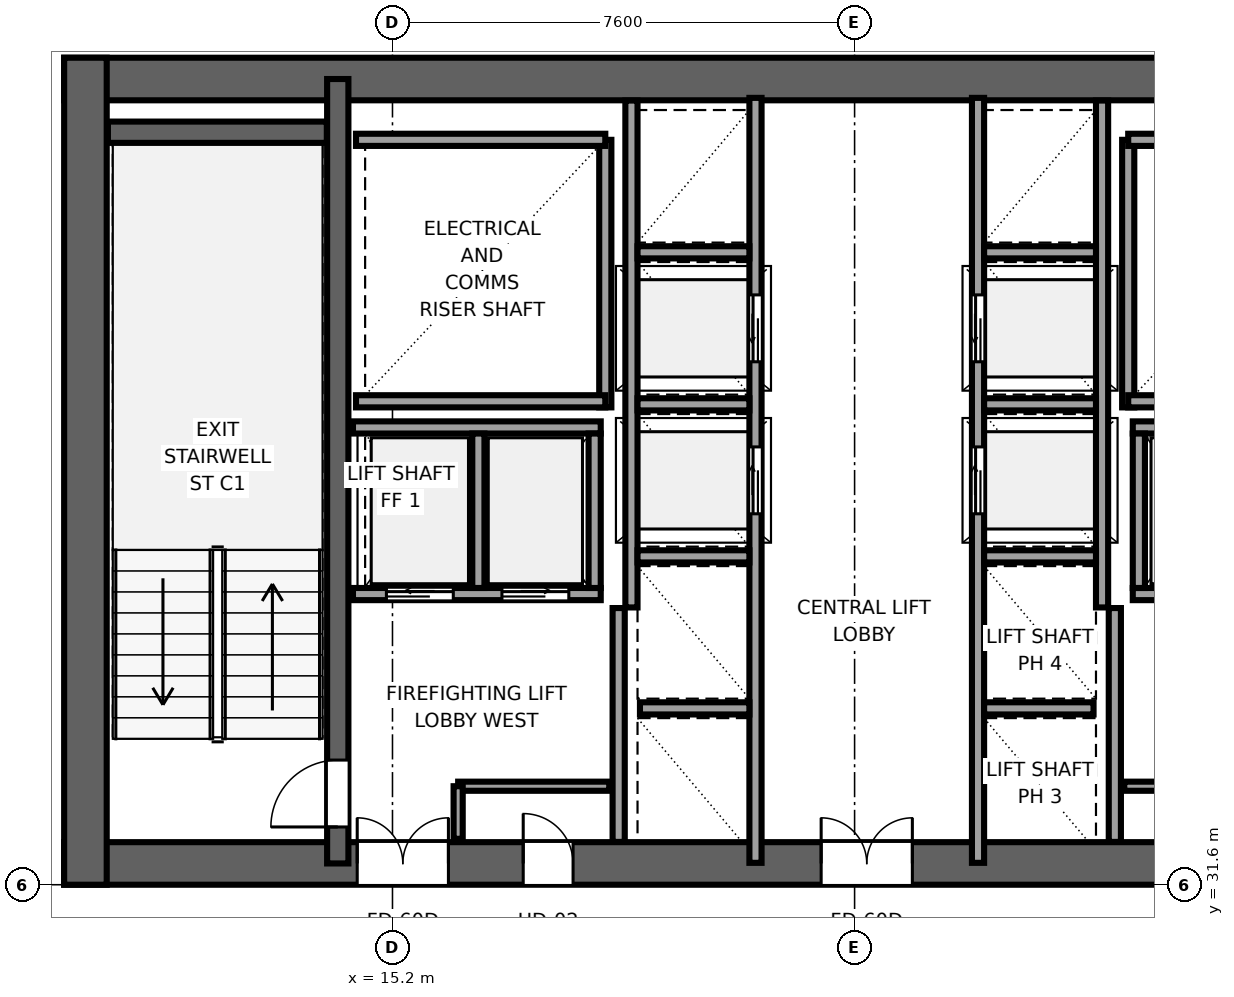
"""IFC4 building model, lengths in metres.
Left out: names, types, materials, properties, quantities, classifications, styles, units other than length and angle.
Written with IfcOpenShell. Run it as: python <this file> out.ifc"""

import sys

from ifc_helpers import new_model, si_unit, direction, frame, frame_2d, origin, place, context, subcontext, project, spatial, rectangle, extrude, source, transform, mapped, element, fill, save


model = new_model("IFC4")
c1 = context("Model", 3, precision=1e-05, world=origin(), true_north=direction((0.0, 1.0)))
c2 = subcontext(c1, "Body", "Model", "MODEL_VIEW")
j1 = project(units=[si_unit("LENGTHUNIT", "METRE"), si_unit("PLANEANGLEUNIT", "RADIAN")], contexts=[c1])
p1 = place(None, origin())
s1 = spatial("IfcSite", under=j1, at=p1, CompositionType="ELEMENT")
p2 = place(p1, origin())
s2 = spatial("IfcBuilding", under=s1, at=p2, CompositionType="ELEMENT")
p3 = place(p2, frame((0.0, 0.0, 115.1)))
s3 = spatial("IfcBuildingStorey", under=s2, at=p3, CompositionType="ELEMENT", Elevation=115.1)
p4 = place(p3, frame((9.8, 31.95, 0.0), z_axis=(0.0, 0.0, 1.0), x_axis=(1.0, 0.0, 0.0)))
e1 = element("IfcWall", 1, at=p4, inside=s3, PredefinedType="SHEAR", context=c2, shape_type="SweptSolid", body=[
    extrude(rectangle(XDim=26.4, YDim=0.7, at=frame_2d((13.2, 0.0))), origin(), (0.0, 0.0, 1.0), 3.55),
])
p5 = place(p4, frame((6.32, 0.0, 0.0), z_axis=(0.0, 0.0, 1.0), x_axis=(-1.0, 0.0, 0.0)))
e2 = element("IfcOpeningElement", 2, at=p5, cuts=e1, PredefinedType="OPENING", context=c2, shape_type="SweptSolid", body=[
    extrude(rectangle(XDim=1.5, YDim=2.04, at=frame_2d((0.75, 1.02))), frame((0.0, 0.36, 0.0), z_axis=(0.0, -1.0, 0.0), x_axis=(1.0, 0.0, 0.0)), (0.0, 0.0, 1.0), 0.72),
])
p6 = place(p4, frame((13.95, 0.0, 0.0), z_axis=(0.0, 0.0, 1.0), x_axis=(-1.0, 0.0, 0.0)))
e3 = element("IfcOpeningElement", 3, at=p6, cuts=e1, PredefinedType="OPENING", context=c2, shape_type="SweptSolid", body=[
    extrude(rectangle(XDim=1.5, YDim=2.04, at=frame_2d((0.75, 1.02))), frame((0.0, 0.36, 0.0), z_axis=(0.0, -1.0, 0.0), x_axis=(1.0, 0.0, 0.0)), (0.0, 0.0, 1.0), 0.72),
])
p7 = place(p4, frame((21.58, 0.0, 0.0), z_axis=(0.0, 0.0, 1.0), x_axis=(-1.0, 0.0, 0.0)))
e4 = element("IfcOpeningElement", 4, at=p7, cuts=e1, PredefinedType="OPENING", context=c2, shape_type="SweptSolid", body=[
    extrude(rectangle(XDim=1.5, YDim=2.04, at=frame_2d((0.75, 1.02))), frame((0.0, 0.36, 0.0), z_axis=(0.0, -1.0, 0.0), x_axis=(1.0, 0.0, 0.0)), (0.0, 0.0, 1.0), 0.72),
])
p8 = place(p4, frame((8.37, 0.0, 0.0), z_axis=(0.0, 0.0, 1.0), x_axis=(-1.0, 0.0, 0.0)))
e5 = element("IfcOpeningElement", 5, at=p8, cuts=e1, PredefinedType="OPENING", context=c2, shape_type="SweptSolid", body=[
    extrude(rectangle(XDim=0.82, YDim=2.01, at=frame_2d((0.41, 1.005))), frame((0.0, 0.36, 0.0), z_axis=(0.0, -1.0, 0.0), x_axis=(1.0, 0.0, 0.0)), (0.0, 0.0, 1.0), 0.72),
])
p9 = place(p4, frame((18.87, 0.0, 0.0), z_axis=(0.0, 0.0, 1.0), x_axis=(-1.0, 0.0, 0.0)))
e6 = element("IfcOpeningElement", 6, at=p9, cuts=e1, PredefinedType="OPENING", context=c2, shape_type="SweptSolid", body=[
    extrude(rectangle(XDim=0.82, YDim=2.01, at=frame_2d((0.41, 1.005))), frame((0.0, 0.36, 0.0), z_axis=(0.0, -1.0, 0.0), x_axis=(1.0, 0.0, 0.0)), (0.0, 0.0, 1.0), 0.72),
])
p10 = place(p3, frame((9.8, 44.85, 0.0), z_axis=(0.0, 0.0, 1.0), x_axis=(1.0, 0.0, 0.0)))
e7 = element("IfcWall", 7, at=p10, inside=s3, PredefinedType="SHEAR", context=c2, shape_type="SweptSolid", body=[
    extrude(rectangle(XDim=26.4, YDim=0.7, at=frame_2d((13.2, 0.0))), origin(), (0.0, 0.0, 1.0), 3.55),
])
p11 = place(p3, frame((10.15, 31.6, 0.0), z_axis=(0.0, 0.0, 1.0), x_axis=(0.0, 1.0, 0.0)))
e8 = element("IfcWall", 8, at=p11, inside=s3, PredefinedType="SHEAR", context=c2, shape_type="SweptSolid", body=[
    extrude(rectangle(XDim=13.6, YDim=0.7, at=frame_2d((6.8, 0.0))), origin(), (0.0, 0.0, 1.0), 3.55),
])
p12 = place(p3, frame((14.3, 31.95, 0.0), z_axis=(0.0, 0.0, 1.0), x_axis=(0.0, 1.0, 0.0)))
e9 = element("IfcWall", 9, at=p12, inside=s3, PredefinedType="SHEAR", context=c2, shape_type="SweptSolid", body=[
    extrude(rectangle(XDim=12.9, YDim=0.35, at=frame_2d((6.45, 0.0))), origin(), (0.0, 0.0, 1.0), 3.55),
])
p13 = place(p12, frame((0.6, 0.0, 0.0)))
e10 = element("IfcOpeningElement", 10, at=p13, cuts=e9, PredefinedType="OPENING", context=c2, shape_type="SweptSolid", body=[
    extrude(rectangle(XDim=1.1, YDim=2.12, at=frame_2d((0.55, 1.06))), frame((0.0, 0.185, 0.0), z_axis=(0.0, -1.0, 0.0), x_axis=(1.0, 0.0, 0.0)), (0.0, 0.0, 1.0), 0.37),
])
p14 = place(p3, frame((10.52, 43.975, 0.0), z_axis=(0.0, 0.0, 1.0), x_axis=(1.0, 0.0, 0.0)))
e11 = element("IfcWall", 11, at=p14, inside=s3, PredefinedType="SHEAR", context=c2, shape_type="SweptSolid", body=[
    extrude(rectangle(XDim=3.6, YDim=0.35, at=frame_2d((1.8, 0.0))), origin(), (0.0, 0.0, 1.0), 3.55),
])
p15 = place(p3, frame((18.7, 39.45, 0.0), z_axis=(0.0, 0.0, 1.0), x_axis=(0.0, 1.0, 0.0)))
e12 = element("IfcWall", 12, at=p15, inside=s3, PredefinedType="SOLIDWALL", context=c2, shape_type="SweptSolid", body=[
    extrude(rectangle(XDim=4.4, YDim=0.2, at=frame_2d((2.2, 0.0))), origin(), (0.0, 0.0, 1.0), 3.37),
])
for number, where, z_axis, x_axis in (
    (13, (14.6, 39.55, 0.0), (0.0, 0.0, 1.0), (1.0, 0.0, 0.0)),
    (14, (14.6, 43.85, 0.0), (0.0, 0.0, 1.0), (1.0, 0.0, 0.0)),
):
    element("IfcWall", number, at=place(p3, frame(where, z_axis=z_axis, x_axis=x_axis)), inside=s3, PredefinedType="SOLIDWALL", context=c2, shape_type="SweptSolid", body=[
        extrude(rectangle(XDim=4.1, YDim=0.2, at=frame_2d((2.05, 0.0))), origin(), (0.0, 0.0, 1.0), 3.37),
    ])
p16 = place(p3, frame((27.3, 39.45, 0.0), z_axis=(0.0, 0.0, 1.0), x_axis=(0.0, 1.0, 0.0)))
e15 = element("IfcWall", 15, at=p16, inside=s3, PredefinedType="SOLIDWALL", context=c2, shape_type="SweptSolid", body=[
    extrude(rectangle(XDim=4.4, YDim=0.2, at=frame_2d((2.2, 0.0))), origin(), (0.0, 0.0, 1.0), 3.37),
])
for number, where, z_axis, x_axis in (
    (16, (27.3, 39.55, 0.0), (0.0, 0.0, 1.0), (1.0, 0.0, 0.0)),
    (17, (27.3, 43.85, 0.0), (0.0, 0.0, 1.0), (1.0, 0.0, 0.0)),
):
    element("IfcWall", number, at=place(p3, frame(where, z_axis=z_axis, x_axis=x_axis)), inside=s3, PredefinedType="SOLIDWALL", context=c2, shape_type="SweptSolid", body=[
        extrude(rectangle(XDim=4.1, YDim=0.2, at=frame_2d((2.05, 0.0))), origin(), (0.0, 0.0, 1.0), 3.37),
    ])
for number, where, z_axis, x_axis in (
    (18, (18.92, 32.304, 0.0), (0.0, 0.0, 1.0), (0.0, 1.0, 0.0)),
    (19, (27.08, 32.304, 0.0), (0.0, 0.0, 1.0), (0.0, 1.0, 0.0)),
):
    element("IfcWall", number, at=place(p3, frame(where, z_axis=z_axis, x_axis=x_axis)), inside=s3, PredefinedType="SOLIDWALL", context=c2, shape_type="SweptSolid", body=[
        extrude(rectangle(XDim=3.846, YDim=0.2, at=frame_2d((1.923, 0.0))), origin(), (0.0, 0.0, 1.0), 3.37),
    ])
p17 = place(p3, frame((21.17, 31.96, 0.0), z_axis=(0.0, 0.0, 1.0), x_axis=(0.0, 1.0, 0.0)))
e20 = element("IfcWall", 20, at=p17, inside=s3, PredefinedType="SOLIDWALL", context=c2, shape_type="SweptSolid", body=[
    extrude(rectangle(XDim=12.58, YDim=0.2, at=frame_2d((6.29, 0.0))), origin(), (0.0, 0.0, 1.0), 3.37),
])
p18 = place(p17, frame((5.74, 0.0, 0.0)))
e21 = element("IfcOpeningElement", 21, at=p18, cuts=e20, PredefinedType="OPENING", context=c2, shape_type="SweptSolid", body=[
    extrude(rectangle(XDim=1.1, YDim=2.12, at=frame_2d((0.55, 1.06))), frame((0.0, 0.11, 0.0), z_axis=(0.0, -1.0, 0.0), x_axis=(1.0, 0.0, 0.0)), (0.0, 0.0, 1.0), 0.22),
])
p19 = place(p17, frame((8.24, 0.0, 0.0)))
e22 = element("IfcOpeningElement", 22, at=p19, cuts=e20, PredefinedType="OPENING", context=c2, shape_type="SweptSolid", body=[
    extrude(rectangle(XDim=1.1, YDim=2.12, at=frame_2d((0.55, 1.06))), frame((0.0, 0.11, 0.0), z_axis=(0.0, -1.0, 0.0), x_axis=(1.0, 0.0, 0.0)), (0.0, 0.0, 1.0), 0.22),
])
p20 = place(p3, frame((19.13, 36.16, 0.0), z_axis=(0.0, 0.0, 1.0), x_axis=(0.0, 1.0, 0.0)))
e23 = element("IfcWall", 23, at=p20, inside=s3, PredefinedType="SOLIDWALL", context=c2, shape_type="SweptSolid", body=[
    extrude(rectangle(XDim=8.336, YDim=0.2, at=frame_2d((4.168, 0.0))), origin(), (0.0, 0.0, 1.0), 3.37),
])
p21 = place(p3, frame((19.27, 34.5, 0.0), z_axis=(0.0, 0.0, 1.0), x_axis=(1.0, 0.0, 0.0)))
e24 = element("IfcWall", 24, at=p21, inside=s3, PredefinedType="SOLIDWALL", context=c2, shape_type="SweptSolid", body=[
    extrude(rectangle(XDim=1.8, YDim=0.2, at=frame_2d((0.9, 0.0))), origin(), (0.0, 0.0, 1.0), 3.37),
])
for number, where, z_axis, x_axis in (
    (25, (19.23, 37.0, 0.0), (0.0, 0.0, 1.0), (1.0, 0.0, 0.0)),
    (26, (19.23, 39.5, 0.0), (0.0, 0.0, 1.0), (1.0, 0.0, 0.0)),
    (27, (19.23, 42.0, 0.0), (0.0, 0.0, 1.0), (1.0, 0.0, 0.0)),
):
    element("IfcWall", number, at=place(p3, frame(where, z_axis=z_axis, x_axis=x_axis)), inside=s3, PredefinedType="SOLIDWALL", context=c2, shape_type="SweptSolid", body=[
        extrude(rectangle(XDim=1.84, YDim=0.2, at=frame_2d((0.92, 0.0))), origin(), (0.0, 0.0, 1.0), 3.37),
    ])
p22 = place(p3, frame((27.375, 36.38, 0.0), z_axis=(0.0, 0.0, 1.0), x_axis=(1.0, 0.0, 0.0)))
e28 = element("IfcWall", 28, at=p22, inside=s3, PredefinedType="SOLIDWALL", context=c2, shape_type="SweptSolid", body=[
    extrude(rectangle(XDim=4.075, YDim=0.2, at=frame_2d((2.038, 0.0))), origin(), (0.0, 0.0, 1.0), 3.37),
])
p23 = place(p22, frame((0.525, 0.0, 0.0)))
e29 = element("IfcOpeningElement", 29, at=p23, cuts=e28, PredefinedType="OPENING", context=c2, shape_type="SweptSolid", body=[
    extrude(rectangle(XDim=1.1, YDim=2.12, at=frame_2d((0.55, 1.06))), frame((0.0, 0.11, 0.0), z_axis=(0.0, -1.0, 0.0), x_axis=(1.0, 0.0, 0.0)), (0.0, 0.0, 1.0), 0.22),
])
p24 = place(p22, frame((2.425, 0.0, 0.0)))
e30 = element("IfcOpeningElement", 30, at=p24, cuts=e28, PredefinedType="OPENING", context=c2, shape_type="SweptSolid", body=[
    extrude(rectangle(XDim=1.1, YDim=2.12, at=frame_2d((0.55, 1.06))), frame((0.0, 0.11, 0.0), z_axis=(0.0, -1.0, 0.0), x_axis=(1.0, 0.0, 0.0)), (0.0, 0.0, 1.0), 0.22),
])
p25 = place(p3, frame((27.375, 39.12, 0.0), z_axis=(0.0, 0.0, 1.0), x_axis=(1.0, 0.0, 0.0)))
e31 = element("IfcWall", 31, at=p25, inside=s3, PredefinedType="SOLIDWALL", context=c2, shape_type="SweptSolid", body=[
    extrude(rectangle(XDim=4.075, YDim=0.2, at=frame_2d((2.038, 0.0))), origin(), (0.0, 0.0, 1.0), 3.37),
])
p26 = place(p3, frame((27.475, 36.48, 0.0), z_axis=(0.0, 0.0, 1.0), x_axis=(0.0, 1.0, 0.0)))
e32 = element("IfcWall", 32, at=p26, inside=s3, PredefinedType="SOLIDWALL", context=c2, shape_type="SweptSolid", body=[
    extrude(rectangle(XDim=2.54, YDim=0.2, at=frame_2d((1.27, 0.0))), origin(), (0.0, 0.0, 1.0), 3.37),
])
p27 = place(p3, frame((14.55, 36.38, 0.0), z_axis=(0.0, 0.0, 1.0), x_axis=(1.0, 0.0, 0.0)))
e33 = element("IfcWall", 33, at=p27, inside=s3, PredefinedType="SOLIDWALL", context=c2, shape_type="SweptSolid", body=[
    extrude(rectangle(XDim=4.075, YDim=0.2, at=frame_2d((2.038, 0.0))), origin(), (0.0, 0.0, 1.0), 3.37),
])
p28 = place(p27, frame((0.55, 0.0, 0.0)))
e34 = element("IfcOpeningElement", 34, at=p28, cuts=e33, PredefinedType="OPENING", context=c2, shape_type="SweptSolid", body=[
    extrude(rectangle(XDim=1.1, YDim=2.12, at=frame_2d((0.55, 1.06))), frame((0.0, 0.11, 0.0), z_axis=(0.0, -1.0, 0.0), x_axis=(1.0, 0.0, 0.0)), (0.0, 0.0, 1.0), 0.22),
])
p29 = place(p27, frame((2.45, 0.0, 0.0)))
e35 = element("IfcOpeningElement", 35, at=p29, cuts=e33, PredefinedType="OPENING", context=c2, shape_type="SweptSolid", body=[
    extrude(rectangle(XDim=1.1, YDim=2.12, at=frame_2d((0.55, 1.06))), frame((0.0, 0.11, 0.0), z_axis=(0.0, -1.0, 0.0), x_axis=(1.0, 0.0, 0.0)), (0.0, 0.0, 1.0), 0.22),
])
p30 = place(p3, frame((14.55, 39.12, 0.0), z_axis=(0.0, 0.0, 1.0), x_axis=(1.0, 0.0, 0.0)))
e36 = element("IfcWall", 36, at=p30, inside=s3, PredefinedType="SOLIDWALL", context=c2, shape_type="SweptSolid", body=[
    extrude(rectangle(XDim=4.075, YDim=0.2, at=frame_2d((2.038, 0.0))), origin(), (0.0, 0.0, 1.0), 3.37),
])
for number, where, z_axis, x_axis in (
    (37, (18.525, 36.48, 0.0), (0.0, 0.0, 1.0), (0.0, 1.0, 0.0)),
    (38, (16.613, 36.48, 0.0), (0.0, 0.0, 1.0), (0.0, 1.0, 0.0)),
):
    element("IfcWall", number, at=place(p3, frame(where, z_axis=z_axis, x_axis=x_axis)), inside=s3, PredefinedType="SOLIDWALL", context=c2, shape_type="SweptSolid", body=[
        extrude(rectangle(XDim=2.54, YDim=0.2, at=frame_2d((1.27, 0.0))), origin(), (0.0, 0.0, 1.0), 3.37),
    ])
p31 = place(p3, frame((24.83, 31.96, 0.0), z_axis=(0.0, 0.0, 1.0), x_axis=(0.0, 1.0, 0.0)))
e39 = element("IfcWall", 39, at=p31, inside=s3, PredefinedType="SOLIDWALL", context=c2, shape_type="SweptSolid", body=[
    extrude(rectangle(XDim=12.58, YDim=0.2, at=frame_2d((6.29, 0.0))), origin(), (0.0, 0.0, 1.0), 3.37),
])
p32 = place(p31, frame((5.74, 0.0, 0.0)))
e40 = element("IfcOpeningElement", 40, at=p32, cuts=e39, PredefinedType="OPENING", context=c2, shape_type="SweptSolid", body=[
    extrude(rectangle(XDim=1.1, YDim=2.12, at=frame_2d((0.55, 1.06))), frame((0.0, 0.11, 0.0), z_axis=(0.0, -1.0, 0.0), x_axis=(1.0, 0.0, 0.0)), (0.0, 0.0, 1.0), 0.22),
])
p33 = place(p31, frame((8.24, 0.0, 0.0)))
e41 = element("IfcOpeningElement", 41, at=p33, cuts=e39, PredefinedType="OPENING", context=c2, shape_type="SweptSolid", body=[
    extrude(rectangle(XDim=1.1, YDim=2.12, at=frame_2d((0.55, 1.06))), frame((0.0, 0.11, 0.0), z_axis=(0.0, -1.0, 0.0), x_axis=(1.0, 0.0, 0.0)), (0.0, 0.0, 1.0), 0.22),
])
p34 = place(p3, frame((26.87, 36.16, 0.0), z_axis=(0.0, 0.0, 1.0), x_axis=(0.0, 1.0, 0.0)))
e42 = element("IfcWall", 42, at=p34, inside=s3, PredefinedType="SOLIDWALL", context=c2, shape_type="SweptSolid", body=[
    extrude(rectangle(XDim=8.336, YDim=0.2, at=frame_2d((4.168, 0.0))), origin(), (0.0, 0.0, 1.0), 3.37),
])
p35 = place(p3, frame((24.93, 34.5, 0.0), z_axis=(0.0, 0.0, 1.0), x_axis=(1.0, 0.0, 0.0)))
e43 = element("IfcWall", 43, at=p35, inside=s3, PredefinedType="SOLIDWALL", context=c2, shape_type="SweptSolid", body=[
    extrude(rectangle(XDim=1.8, YDim=0.2, at=frame_2d((0.9, 0.0))), origin(), (0.0, 0.0, 1.0), 3.37),
])
for number, where, z_axis, x_axis in (
    (44, (24.93, 37.0, 0.0), (0.0, 0.0, 1.0), (1.0, 0.0, 0.0)),
    (45, (24.93, 39.5, 0.0), (0.0, 0.0, 1.0), (1.0, 0.0, 0.0)),
    (46, (24.93, 42.0, 0.0), (0.0, 0.0, 1.0), (1.0, 0.0, 0.0)),
):
    element("IfcWall", number, at=place(p3, frame(where, z_axis=z_axis, x_axis=x_axis)), inside=s3, PredefinedType="SOLIDWALL", context=c2, shape_type="SweptSolid", body=[
        extrude(rectangle(XDim=1.84, YDim=0.2, at=frame_2d((0.92, 0.0))), origin(), (0.0, 0.0, 1.0), 3.37),
    ])
p36 = place(p3, frame((16.28, 33.22, 0.0), z_axis=(0.0, 0.0, 1.0), x_axis=(1.0, 0.0, 0.0)))
e47 = element("IfcWall", 47, at=p36, inside=s3, PredefinedType="PARTITIONING", context=c2, shape_type="SweptSolid", body=[
    extrude(rectangle(XDim=2.485, YDim=0.15, at=frame_2d((1.242, 0.0))), origin(), (0.0, 0.0, 1.0), 3.37),
])
p37 = place(p3, frame((16.28, 32.355, 0.0), z_axis=(0.0, 0.0, 1.0), x_axis=(0.0, 1.0, 0.0)))
e48 = element("IfcWall", 48, at=p37, inside=s3, PredefinedType="PARTITIONING", context=c2, shape_type="SweptSolid", body=[
    extrude(rectangle(XDim=0.865, YDim=0.15, at=frame_2d((0.433, 0.0))), origin(), (0.0, 0.0, 1.0), 3.37),
])
p38 = place(p3, frame((27.235, 33.22, 0.0), z_axis=(0.0, 0.0, 1.0), x_axis=(1.0, 0.0, 0.0)))
e49 = element("IfcWall", 49, at=p38, inside=s3, PredefinedType="PARTITIONING", context=c2, shape_type="SweptSolid", body=[
    extrude(rectangle(XDim=2.485, YDim=0.15, at=frame_2d((1.242, 0.0))), origin(), (0.0, 0.0, 1.0), 3.37),
])
m1 = source(origin(), c2, "Body", "SweptSolid", [
    extrude(rectangle(XDim=1.1, YDim=2.12, at=frame_2d((0.55, 1.06))), frame((0.0, 0.025, 0.0), z_axis=(0.0, -1.0, 0.0), x_axis=(1.0, 0.0, 0.0)), (0.0, 0.0, 1.0), 0.05),
])
p39 = place(p13, origin())
e50 = element("IfcDoor", 50, at=p39, inside=s3, OperationType="SINGLE_SWING_LEFT", PredefinedType="DOOR", context=c2, shape_type="MappedRepresentation", body=[
    mapped(m1, transform((0.0, 0.0, 0.0), x_axis=(1.0, 0.0, 0.0), y_axis=(0.0, 1.0, 0.0), z_axis=(0.0, 0.0, 1.0), scale=1.0)),
])
fill(e10, e50)
m2 = source(origin(), c2, "Body", "SweptSolid", [
    extrude(rectangle(XDim=1.5, YDim=2.04, at=frame_2d((0.75, 1.02))), frame((0.0, 0.025, 0.0), z_axis=(0.0, -1.0, 0.0), x_axis=(1.0, 0.0, 0.0)), (0.0, 0.0, 1.0), 0.05),
])
p40 = place(p5, origin())
e51 = element("IfcDoor", 51, at=p40, inside=s3, OperationType="DOUBLE_DOOR_SINGLE_SWING", PredefinedType="DOOR", context=c2, shape_type="MappedRepresentation", body=[
    mapped(m2, transform((0.0, 0.0, 0.0), x_axis=(1.0, 0.0, 0.0), y_axis=(0.0, 1.0, 0.0), z_axis=(0.0, 0.0, 1.0), scale=1.0)),
])
fill(e2, e51)
p41 = place(p6, origin())
e52 = element("IfcDoor", 52, at=p41, inside=s3, OperationType="DOUBLE_DOOR_SINGLE_SWING", PredefinedType="DOOR", context=c2, shape_type="MappedRepresentation", body=[
    mapped(m2, transform((0.0, 0.0, 0.0), x_axis=(1.0, 0.0, 0.0), y_axis=(0.0, 1.0, 0.0), z_axis=(0.0, 0.0, 1.0), scale=1.0)),
])
fill(e3, e52)
m3 = source(origin(), c2, "Body", "SweptSolid", [
    extrude(rectangle(XDim=0.82, YDim=2.01, at=frame_2d((0.41, 1.005))), frame((0.0, 0.025, 0.0), z_axis=(0.0, -1.0, 0.0), x_axis=(1.0, 0.0, 0.0)), (0.0, 0.0, 1.0), 0.05),
])
p42 = place(p8, origin())
e53 = element("IfcDoor", 53, at=p42, inside=s3, OperationType="SINGLE_SWING_LEFT", PredefinedType="DOOR", context=c2, shape_type="MappedRepresentation", body=[
    mapped(m3, transform((0.0, 0.0, 0.0), x_axis=(1.0, 0.0, 0.0), y_axis=(0.0, 1.0, 0.0), z_axis=(0.0, 0.0, 1.0), scale=1.0)),
])
fill(e5, e53)
m4 = source(origin(), c2, "Body", "SweptSolid", [
    extrude(rectangle(XDim=1.1, YDim=2.12, at=frame_2d((0.55, 1.06))), frame((0.0, 0.025, 0.0), z_axis=(0.0, -1.0, 0.0), x_axis=(1.0, 0.0, 0.0)), (0.0, 0.0, 1.0), 0.05),
])
p43 = place(p18, origin())
e54 = element("IfcDoor", 54, at=p43, inside=s3, OperationType="SLIDING_TO_RIGHT", PredefinedType="DOOR", context=c2, shape_type="MappedRepresentation", body=[
    mapped(m4, transform((0.0, 0.0, 0.0), x_axis=(1.0, 0.0, 0.0), y_axis=(0.0, 1.0, 0.0), z_axis=(0.0, 0.0, 1.0), scale=1.0)),
])
fill(e21, e54)
p44 = place(p19, origin())
e55 = element("IfcDoor", 55, at=p44, inside=s3, OperationType="SLIDING_TO_LEFT", PredefinedType="DOOR", context=c2, shape_type="MappedRepresentation", body=[
    mapped(m4, transform((0.0, 0.0, 0.0), x_axis=(1.0, 0.0, 0.0), y_axis=(0.0, 1.0, 0.0), z_axis=(0.0, 0.0, 1.0), scale=1.0)),
])
fill(e22, e55)
p45 = place(p28, origin())
e56 = element("IfcDoor", 56, at=p45, inside=s3, OperationType="SLIDING_TO_LEFT", PredefinedType="DOOR", context=c2, shape_type="MappedRepresentation", body=[
    mapped(m4, transform((0.0, 0.0, 0.0), x_axis=(1.0, 0.0, 0.0), y_axis=(0.0, 1.0, 0.0), z_axis=(0.0, 0.0, 1.0), scale=1.0)),
])
fill(e34, e56)
p46 = place(p29, origin())
e57 = element("IfcDoor", 57, at=p46, inside=s3, OperationType="SLIDING_TO_RIGHT", PredefinedType="DOOR", context=c2, shape_type="MappedRepresentation", body=[
    mapped(m4, transform((0.0, 0.0, 0.0), x_axis=(1.0, 0.0, 0.0), y_axis=(0.0, 1.0, 0.0), z_axis=(0.0, 0.0, 1.0), scale=1.0)),
])
fill(e35, e57)
p47 = place(p32, origin())
e58 = element("IfcDoor", 58, at=p47, inside=s3, OperationType="SLIDING_TO_RIGHT", PredefinedType="DOOR", context=c2, shape_type="MappedRepresentation", body=[
    mapped(m4, transform((0.0, 0.0, 0.0), x_axis=(1.0, 0.0, 0.0), y_axis=(0.0, 1.0, 0.0), z_axis=(0.0, 0.0, 1.0), scale=1.0)),
])
fill(e40, e58)
p48 = place(p33, origin())
e59 = element("IfcDoor", 59, at=p48, inside=s3, OperationType="SLIDING_TO_LEFT", PredefinedType="DOOR", context=c2, shape_type="MappedRepresentation", body=[
    mapped(m4, transform((0.0, 0.0, 0.0), x_axis=(1.0, 0.0, 0.0), y_axis=(0.0, 1.0, 0.0), z_axis=(0.0, 0.0, 1.0), scale=1.0)),
])
fill(e41, e59)
save(model, sys.argv[1])
